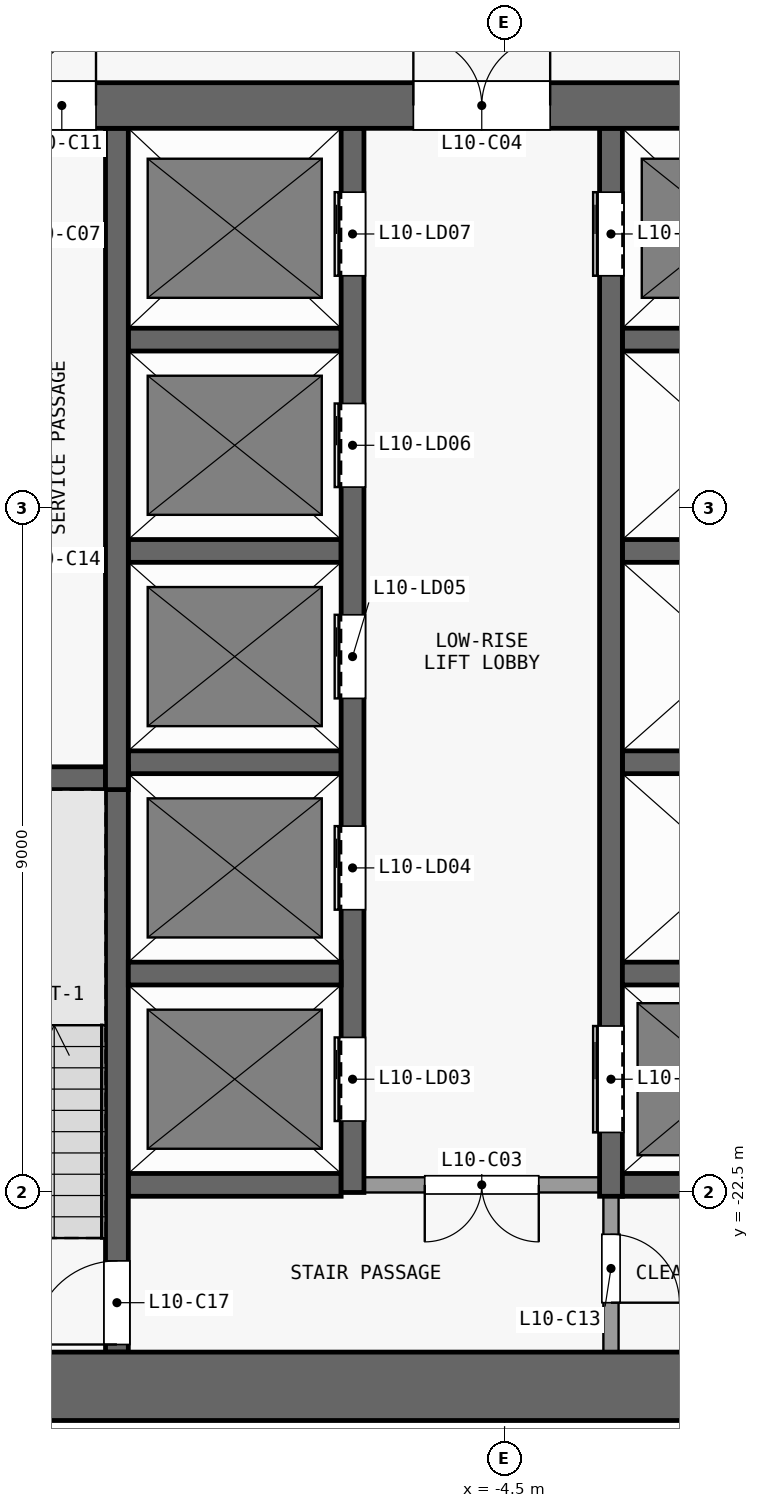
"""IFC4 building model, lengths in metres.
Left out: names, types, materials, properties, quantities, classifications, styles, units other than length and angle.
Written with IfcOpenShell. Run it as: python <this file> out.ifc"""

import sys

from ifc_helpers import new_model, si_unit, direction, frame, frame_2d, origin, place, context, subcontext, project, spatial, rectangle, extrude, element, fill, save


model = new_model("IFC4")
c1 = context("Model", 3, precision=1e-05, world=origin(), true_north=direction((0.0, 1.0)))
c2 = subcontext(c1, "Body", "Model", "MODEL_VIEW")
j1 = project(units=[si_unit("LENGTHUNIT", "METRE"), si_unit("PLANEANGLEUNIT", "RADIAN")], contexts=[c1])
p1 = place(None, origin())
s1 = spatial("IfcSite", under=j1, at=p1, CompositionType="ELEMENT")
p2 = place(p1, origin())
s2 = spatial("IfcBuilding", under=s1, at=p2, CompositionType="ELEMENT")
p3 = place(p2, frame((0.0, 0.0, 46.9)))
s3 = spatial("IfcBuildingStorey", under=s2, at=p3, CompositionType="ELEMENT", Elevation=46.9)
p4 = place(p3, frame((-13.5, -25.05, 0.0), z_axis=(0.0, 0.0, 1.0), x_axis=(1.0, 0.0, 0.0)))
e1 = element("IfcWall", 1, at=p4, inside=s3, PredefinedType="SHEAR", context=c2, shape_type="SweptSolid", body=[
    extrude(rectangle(XDim=27.0, YDim=0.9, at=frame_2d((13.5, 0.0))), origin(), (0.0, 0.0, 1.0), 3.3),
])
p5 = place(p3, frame((-13.5, -8.2, 0.0), z_axis=(0.0, 0.0, 1.0), x_axis=(1.0, 0.0, 0.0)))
e2 = element("IfcWall", 2, at=p5, inside=s3, PredefinedType="SHEAR", context=c2, shape_type="SweptSolid", body=[
    extrude(rectangle(XDim=27.0, YDim=0.6, at=frame_2d((13.5, 0.0))), origin(), (0.0, 0.0, 1.0), 3.3),
])
p6 = place(p5, frame((7.8, 0.0, 0.0)))
e3 = element("IfcOpeningElement", 3, at=p6, cuts=e2, PredefinedType="OPENING", context=c2, shape_type="SweptSolid", body=[
    extrude(rectangle(XDim=1.8, YDim=2.1, at=frame_2d((0.9, 1.05))), frame((0.0, 0.31, 0.0), z_axis=(0.0, -1.0, 0.0), x_axis=(1.0, 0.0, 0.0)), (0.0, 0.0, 1.0), 0.62),
])
p7 = place(p5, frame((17.4, 0.0, 0.0)))
e4 = element("IfcOpeningElement", 4, at=p7, cuts=e2, PredefinedType="OPENING", context=c2, shape_type="SweptSolid", body=[
    extrude(rectangle(XDim=1.8, YDim=2.1, at=frame_2d((0.9, 1.05))), frame((0.0, 0.31, 0.0), z_axis=(0.0, -1.0, 0.0), x_axis=(1.0, 0.0, 0.0)), (0.0, 0.0, 1.0), 0.62),
])
p8 = place(p5, frame((2.725, 0.0, 0.0)))
e5 = element("IfcOpeningElement", 5, at=p8, cuts=e2, PredefinedType="OPENING", context=c2, shape_type="SweptSolid", body=[
    extrude(rectangle(XDim=0.9, YDim=2.1, at=frame_2d((0.45, 1.05))), frame((0.0, 0.31, 0.0), z_axis=(0.0, -1.0, 0.0), x_axis=(1.0, 0.0, 0.0)), (0.0, 0.0, 1.0), 0.62),
])
p9 = place(p5, frame((23.375, 0.0, 0.0)))
e6 = element("IfcOpeningElement", 6, at=p9, cuts=e2, PredefinedType="OPENING", context=c2, shape_type="SweptSolid", body=[
    extrude(rectangle(XDim=0.9, YDim=2.1, at=frame_2d((0.45, 1.05))), frame((0.0, 0.31, 0.0), z_axis=(0.0, -1.0, 0.0), x_axis=(1.0, 0.0, 0.0)), (0.0, 0.0, 1.0), 0.62),
])
p10 = place(p3, frame((-9.45, -22.4, 0.0), z_axis=(0.0, 0.0, 1.0), x_axis=(1.0, 0.0, 0.0)))
e7 = element("IfcWall", 7, at=p10, inside=s3, PredefinedType="SHEAR", context=c2, shape_type="SweptSolid", body=[
    extrude(rectangle(XDim=2.8, YDim=0.3, at=frame_2d((1.4, 0.0))), origin(), (0.0, 0.0, 1.0), 3.3),
])
p11 = place(p3, frame((-3.25, -22.4, 0.0), z_axis=(0.0, 0.0, 1.0), x_axis=(-1.0, 0.0, 0.0)))
e8 = element("IfcWall", 8, at=p11, inside=s3, PredefinedType="PARTITIONING", context=c2, shape_type="SweptSolid", body=[
    extrude(rectangle(XDim=3.1, YDim=0.2, at=frame_2d((1.55, 0.0))), origin(), (0.0, 0.0, 1.0), 3.3),
])
p12 = place(p11, frame((0.8, 0.0, 0.0)))
e9 = element("IfcOpeningElement", 9, at=p12, cuts=e8, PredefinedType="OPENING", context=c2, shape_type="SweptSolid", body=[
    extrude(rectangle(XDim=1.5, YDim=2.1, at=frame_2d((0.75, 1.05))), frame((0.0, 0.11, 0.0), z_axis=(0.0, -1.0, 0.0), x_axis=(1.0, 0.0, 0.0)), (0.0, 0.0, 1.0), 0.22),
])
p13 = place(p3, frame((-2.95, -22.4, 0.0), z_axis=(0.0, 0.0, 1.0), x_axis=(1.0, 0.0, 0.0)))
e10 = element("IfcWall", 10, at=p13, inside=s3, PredefinedType="SHEAR", context=c2, shape_type="SweptSolid", body=[
    extrude(rectangle(XDim=6.2, YDim=0.3, at=frame_2d((3.1, 0.0))), origin(), (0.0, 0.0, 1.0), 3.3),
])
for number, where, z_axis, x_axis in (
    (11, (-9.45, -19.62, 0.0), (0.0, 0.0, 1.0), (1.0, 0.0, 0.0)),
    (12, (-2.95, -19.62, 0.0), (0.0, 0.0, 1.0), (1.0, 0.0, 0.0)),
):
    element("IfcWall", number, at=place(p3, frame(where, z_axis=z_axis, x_axis=x_axis)), inside=s3, PredefinedType="SHEAR", context=c2, shape_type="SweptSolid", body=[
        extrude(rectangle(XDim=2.8, YDim=0.3, at=frame_2d((1.4, 0.0))), origin(), (0.0, 0.0, 1.0), 3.3),
    ])
p14 = place(p3, frame((-12.6, -17.05, 0.0), z_axis=(0.0, 0.0, 1.0), x_axis=(1.0, 0.0, 0.0)))
e13 = element("IfcWall", 13, at=p14, inside=s3, PredefinedType="SHEAR", context=c2, shape_type="SweptSolid", body=[
    extrude(rectangle(XDim=2.85, YDim=0.3, at=frame_2d((1.425, 0.0))), origin(), (0.0, 0.0, 1.0), 3.3),
])
for number, where, z_axis, x_axis in (
    (14, (-9.45, -16.84, 0.0), (0.0, 0.0, 1.0), (1.0, 0.0, 0.0)),
    (15, (-2.95, -16.84, 0.0), (0.0, 0.0, 1.0), (1.0, 0.0, 0.0)),
    (16, (-9.45, -14.06, 0.0), (0.0, 0.0, 1.0), (1.0, 0.0, 0.0)),
    (17, (-2.95, -14.06, 0.0), (0.0, 0.0, 1.0), (1.0, 0.0, 0.0)),
    (18, (-9.45, -11.28, 0.0), (0.0, 0.0, 1.0), (1.0, 0.0, 0.0)),
    (19, (-2.95, -11.28, 0.0), (0.0, 0.0, 1.0), (1.0, 0.0, 0.0)),
):
    element("IfcWall", number, at=place(p3, frame(where, z_axis=z_axis, x_axis=x_axis)), inside=s3, PredefinedType="SHEAR", context=c2, shape_type="SweptSolid", body=[
        extrude(rectangle(XDim=2.8, YDim=0.3, at=frame_2d((1.4, 0.0))), origin(), (0.0, 0.0, 1.0), 3.3),
    ])
p15 = place(p3, frame((-9.6, -24.6, 0.0), z_axis=(0.0, 0.0, 1.0), x_axis=(0.0, 1.0, 0.0)))
e20 = element("IfcWall", 20, at=p15, inside=s3, PredefinedType="SHEAR", context=c2, shape_type="SweptSolid", body=[
    extrude(rectangle(XDim=7.7, YDim=0.3, at=frame_2d((3.85, 0.0))), origin(), (0.0, 0.0, 1.0), 3.3),
])
p16 = place(p15, frame((0.1, 0.0, 0.0)))
e21 = element("IfcOpeningElement", 21, at=p16, cuts=e20, PredefinedType="OPENING", context=c2, shape_type="SweptSolid", body=[
    extrude(rectangle(XDim=1.1, YDim=2.1, at=frame_2d((0.55, 1.05))), frame((0.0, 0.16, 0.0), z_axis=(0.0, -1.0, 0.0), x_axis=(1.0, 0.0, 0.0)), (0.0, 0.0, 1.0), 0.32),
])
p17 = place(p3, frame((-9.6, -17.2, 0.0), z_axis=(0.0, 0.0, 1.0), x_axis=(0.0, 1.0, 0.0)))
e22 = element("IfcWall", 22, at=p17, inside=s3, PredefinedType="SHEAR", context=c2, shape_type="SweptSolid", body=[
    extrude(rectangle(XDim=8.7, YDim=0.3, at=frame_2d((4.35, 0.0))), origin(), (0.0, 0.0, 1.0), 3.3),
])
p18 = place(p3, frame((-6.5, -22.5, 0.0), z_axis=(0.0, 0.0, 1.0), x_axis=(0.0, 1.0, 0.0)))
e23 = element("IfcWall", 23, at=p18, inside=s3, PredefinedType="SHEAR", context=c2, shape_type="SweptSolid", body=[
    extrude(rectangle(XDim=14.0, YDim=0.3, at=frame_2d((7.0, 0.0))), origin(), (0.0, 0.0, 1.0), 3.3),
])
p19 = place(p18, frame((0.94, 0.0, 0.0)))
e24 = element("IfcOpeningElement", 24, at=p19, cuts=e23, PredefinedType="OPENING", context=c2, shape_type="SweptSolid", body=[
    extrude(rectangle(XDim=1.1, YDim=2.1, at=frame_2d((0.55, 1.05))), frame((0.0, 0.16, 0.0), z_axis=(0.0, -1.0, 0.0), x_axis=(1.0, 0.0, 0.0)), (0.0, 0.0, 1.0), 0.32),
])
p20 = place(p18, frame((3.72, 0.0, 0.0)))
e25 = element("IfcOpeningElement", 25, at=p20, cuts=e23, PredefinedType="OPENING", context=c2, shape_type="SweptSolid", body=[
    extrude(rectangle(XDim=1.1, YDim=2.1, at=frame_2d((0.55, 1.05))), frame((0.0, 0.16, 0.0), z_axis=(0.0, -1.0, 0.0), x_axis=(1.0, 0.0, 0.0)), (0.0, 0.0, 1.0), 0.32),
])
p21 = place(p18, frame((6.5, 0.0, 0.0)))
e26 = element("IfcOpeningElement", 26, at=p21, cuts=e23, PredefinedType="OPENING", context=c2, shape_type="SweptSolid", body=[
    extrude(rectangle(XDim=1.1, YDim=2.1, at=frame_2d((0.55, 1.05))), frame((0.0, 0.16, 0.0), z_axis=(0.0, -1.0, 0.0), x_axis=(1.0, 0.0, 0.0)), (0.0, 0.0, 1.0), 0.32),
])
p22 = place(p18, frame((9.28, 0.0, 0.0)))
e27 = element("IfcOpeningElement", 27, at=p22, cuts=e23, PredefinedType="OPENING", context=c2, shape_type="SweptSolid", body=[
    extrude(rectangle(XDim=1.1, YDim=2.1, at=frame_2d((0.55, 1.05))), frame((0.0, 0.16, 0.0), z_axis=(0.0, -1.0, 0.0), x_axis=(1.0, 0.0, 0.0)), (0.0, 0.0, 1.0), 0.32),
])
p23 = place(p18, frame((12.06, 0.0, 0.0)))
e28 = element("IfcOpeningElement", 28, at=p23, cuts=e23, PredefinedType="OPENING", context=c2, shape_type="SweptSolid", body=[
    extrude(rectangle(XDim=1.1, YDim=2.1, at=frame_2d((0.55, 1.05))), frame((0.0, 0.16, 0.0), z_axis=(0.0, -1.0, 0.0), x_axis=(1.0, 0.0, 0.0)), (0.0, 0.0, 1.0), 0.32),
])
p24 = place(p3, frame((-3.1, -22.55, 0.0), z_axis=(0.0, 0.0, 1.0), x_axis=(0.0, -1.0, 0.0)))
e29 = element("IfcWall", 29, at=p24, inside=s3, PredefinedType="PARTITIONING", context=c2, shape_type="SweptSolid", body=[
    extrude(rectangle(XDim=2.05, YDim=0.2, at=frame_2d((1.025, 0.0))), origin(), (0.0, 0.0, 1.0), 3.3),
])
p25 = place(p24, frame((0.5, 0.0, 0.0)))
e30 = element("IfcOpeningElement", 30, at=p25, cuts=e29, PredefinedType="OPENING", context=c2, shape_type="SweptSolid", body=[
    extrude(rectangle(XDim=0.9, YDim=2.1, at=frame_2d((0.45, 1.05))), frame((0.0, 0.11, 0.0), z_axis=(0.0, -1.0, 0.0), x_axis=(1.0, 0.0, 0.0)), (0.0, 0.0, 1.0), 0.22),
])
p26 = place(p3, frame((-3.1, -22.55, 0.0), z_axis=(0.0, 0.0, 1.0), x_axis=(0.0, 1.0, 0.0)))
e31 = element("IfcWall", 31, at=p26, inside=s3, PredefinedType="SHEAR", context=c2, shape_type="SweptSolid", body=[
    extrude(rectangle(XDim=14.05, YDim=0.3, at=frame_2d((7.025, 0.0))), origin(), (0.0, 0.0, 1.0), 3.3),
])
p27 = place(p26, frame((12.11, 0.0, 0.0)))
e32 = element("IfcOpeningElement", 32, at=p27, cuts=e31, PredefinedType="OPENING", context=c2, shape_type="SweptSolid", body=[
    extrude(rectangle(XDim=1.1, YDim=2.1, at=frame_2d((0.55, 1.05))), frame((0.0, 0.16, 0.0), z_axis=(0.0, -1.0, 0.0), x_axis=(1.0, 0.0, 0.0)), (0.0, 0.0, 1.0), 0.32),
])
p28 = place(p26, frame((0.84, 0.0, 0.0)))
e33 = element("IfcOpeningElement", 33, at=p28, cuts=e31, PredefinedType="OPENING", context=c2, shape_type="SweptSolid", body=[
    extrude(rectangle(XDim=1.4, YDim=2.1, at=frame_2d((0.7, 1.05))), frame((0.0, 0.16, 0.0), z_axis=(0.0, -1.0, 0.0), x_axis=(1.0, 0.0, 0.0)), (0.0, 0.0, 1.0), 0.32),
])
p29 = place(p19, origin())
e34 = element("IfcDoor", 34, at=p29, inside=s3, OperationType="DOUBLE_DOOR_SLIDING", PredefinedType="DOOR", context=c2, shape_type="SweptSolid", body=[
    extrude(rectangle(XDim=1.1, YDim=2.1, at=frame_2d((0.55, 1.05))), frame((0.0, 0.025, 0.0), z_axis=(0.0, -1.0, 0.0), x_axis=(1.0, 0.0, 0.0)), (0.0, 0.0, 1.0), 0.05),
])
fill(e24, e34)
p30 = place(p20, origin())
e35 = element("IfcDoor", 35, at=p30, inside=s3, OperationType="DOUBLE_DOOR_SLIDING", PredefinedType="DOOR", context=c2, shape_type="SweptSolid", body=[
    extrude(rectangle(XDim=1.1, YDim=2.1, at=frame_2d((0.55, 1.05))), frame((0.0, 0.025, 0.0), z_axis=(0.0, -1.0, 0.0), x_axis=(1.0, 0.0, 0.0)), (0.0, 0.0, 1.0), 0.05),
])
fill(e25, e35)
p31 = place(p21, origin())
e36 = element("IfcDoor", 36, at=p31, inside=s3, OperationType="DOUBLE_DOOR_SLIDING", PredefinedType="DOOR", context=c2, shape_type="SweptSolid", body=[
    extrude(rectangle(XDim=1.1, YDim=2.1, at=frame_2d((0.55, 1.05))), frame((0.0, 0.025, 0.0), z_axis=(0.0, -1.0, 0.0), x_axis=(1.0, 0.0, 0.0)), (0.0, 0.0, 1.0), 0.05),
])
fill(e26, e36)
p32 = place(p22, origin())
e37 = element("IfcDoor", 37, at=p32, inside=s3, OperationType="DOUBLE_DOOR_SLIDING", PredefinedType="DOOR", context=c2, shape_type="SweptSolid", body=[
    extrude(rectangle(XDim=1.1, YDim=2.1, at=frame_2d((0.55, 1.05))), frame((0.0, 0.025, 0.0), z_axis=(0.0, -1.0, 0.0), x_axis=(1.0, 0.0, 0.0)), (0.0, 0.0, 1.0), 0.05),
])
fill(e27, e37)
p33 = place(p23, origin())
e38 = element("IfcDoor", 38, at=p33, inside=s3, OperationType="DOUBLE_DOOR_SLIDING", PredefinedType="DOOR", context=c2, shape_type="SweptSolid", body=[
    extrude(rectangle(XDim=1.1, YDim=2.1, at=frame_2d((0.55, 1.05))), frame((0.0, 0.025, 0.0), z_axis=(0.0, -1.0, 0.0), x_axis=(1.0, 0.0, 0.0)), (0.0, 0.0, 1.0), 0.05),
])
fill(e28, e38)
p34 = place(p27, origin())
e39 = element("IfcDoor", 39, at=p34, inside=s3, OperationType="DOUBLE_DOOR_SLIDING", PredefinedType="DOOR", context=c2, shape_type="SweptSolid", body=[
    extrude(rectangle(XDim=1.1, YDim=2.1, at=frame_2d((0.55, 1.05))), frame((0.0, 0.025, 0.0), z_axis=(0.0, -1.0, 0.0), x_axis=(1.0, 0.0, 0.0)), (0.0, 0.0, 1.0), 0.05),
])
fill(e32, e39)
p35 = place(p28, origin())
e40 = element("IfcDoor", 40, at=p35, inside=s3, OperationType="DOUBLE_DOOR_SLIDING", PredefinedType="DOOR", context=c2, shape_type="SweptSolid", body=[
    extrude(rectangle(XDim=1.4, YDim=2.1, at=frame_2d((0.7, 1.05))), frame((0.0, 0.025, 0.0), z_axis=(0.0, -1.0, 0.0), x_axis=(1.0, 0.0, 0.0)), (0.0, 0.0, 1.0), 0.05),
])
fill(e33, e40)
p36 = place(p12, origin())
e41 = element("IfcDoor", 41, at=p36, inside=s3, OperationType="DOUBLE_DOOR_SINGLE_SWING", PredefinedType="DOOR", context=c2, shape_type="SweptSolid", body=[
    extrude(rectangle(XDim=1.5, YDim=2.1, at=frame_2d((0.75, 1.05))), frame((0.0, 0.025, 0.0), z_axis=(0.0, -1.0, 0.0), x_axis=(1.0, 0.0, 0.0)), (0.0, 0.0, 1.0), 0.05),
])
fill(e9, e41)
p37 = place(p6, origin())
e42 = element("IfcDoor", 42, at=p37, inside=s3, OperationType="DOUBLE_DOOR_SINGLE_SWING", PredefinedType="DOOR", context=c2, shape_type="SweptSolid", body=[
    extrude(rectangle(XDim=1.8, YDim=2.1, at=frame_2d((0.9, 1.05))), frame((0.0, 0.025, 0.0), z_axis=(0.0, -1.0, 0.0), x_axis=(1.0, 0.0, 0.0)), (0.0, 0.0, 1.0), 0.05),
])
fill(e3, e42)
p38 = place(p8, origin())
e43 = element("IfcDoor", 43, at=p38, inside=s3, OperationType="SINGLE_SWING_RIGHT", PredefinedType="DOOR", context=c2, shape_type="SweptSolid", body=[
    extrude(rectangle(XDim=0.9, YDim=2.1, at=frame_2d((0.45, 1.05))), frame((0.0, 0.025, 0.0), z_axis=(0.0, -1.0, 0.0), x_axis=(1.0, 0.0, 0.0)), (0.0, 0.0, 1.0), 0.05),
])
fill(e5, e43)
p39 = place(p25, origin())
e44 = element("IfcDoor", 44, at=p39, inside=s3, OperationType="SINGLE_SWING_RIGHT", PredefinedType="DOOR", context=c2, shape_type="SweptSolid", body=[
    extrude(rectangle(XDim=0.9, YDim=2.1, at=frame_2d((0.45, 1.05))), frame((0.0, 0.025, 0.0), z_axis=(0.0, -1.0, 0.0), x_axis=(1.0, 0.0, 0.0)), (0.0, 0.0, 1.0), 0.05),
])
fill(e30, e44)
p40 = place(p16, origin())
e45 = element("IfcDoor", 45, at=p40, inside=s3, OperationType="SINGLE_SWING_LEFT", PredefinedType="DOOR", context=c2, shape_type="SweptSolid", body=[
    extrude(rectangle(XDim=1.1, YDim=2.1, at=frame_2d((0.55, 1.05))), frame((0.0, 0.025, 0.0), z_axis=(0.0, -1.0, 0.0), x_axis=(1.0, 0.0, 0.0)), (0.0, 0.0, 1.0), 0.05),
])
fill(e21, e45)
save(model, sys.argv[1])
